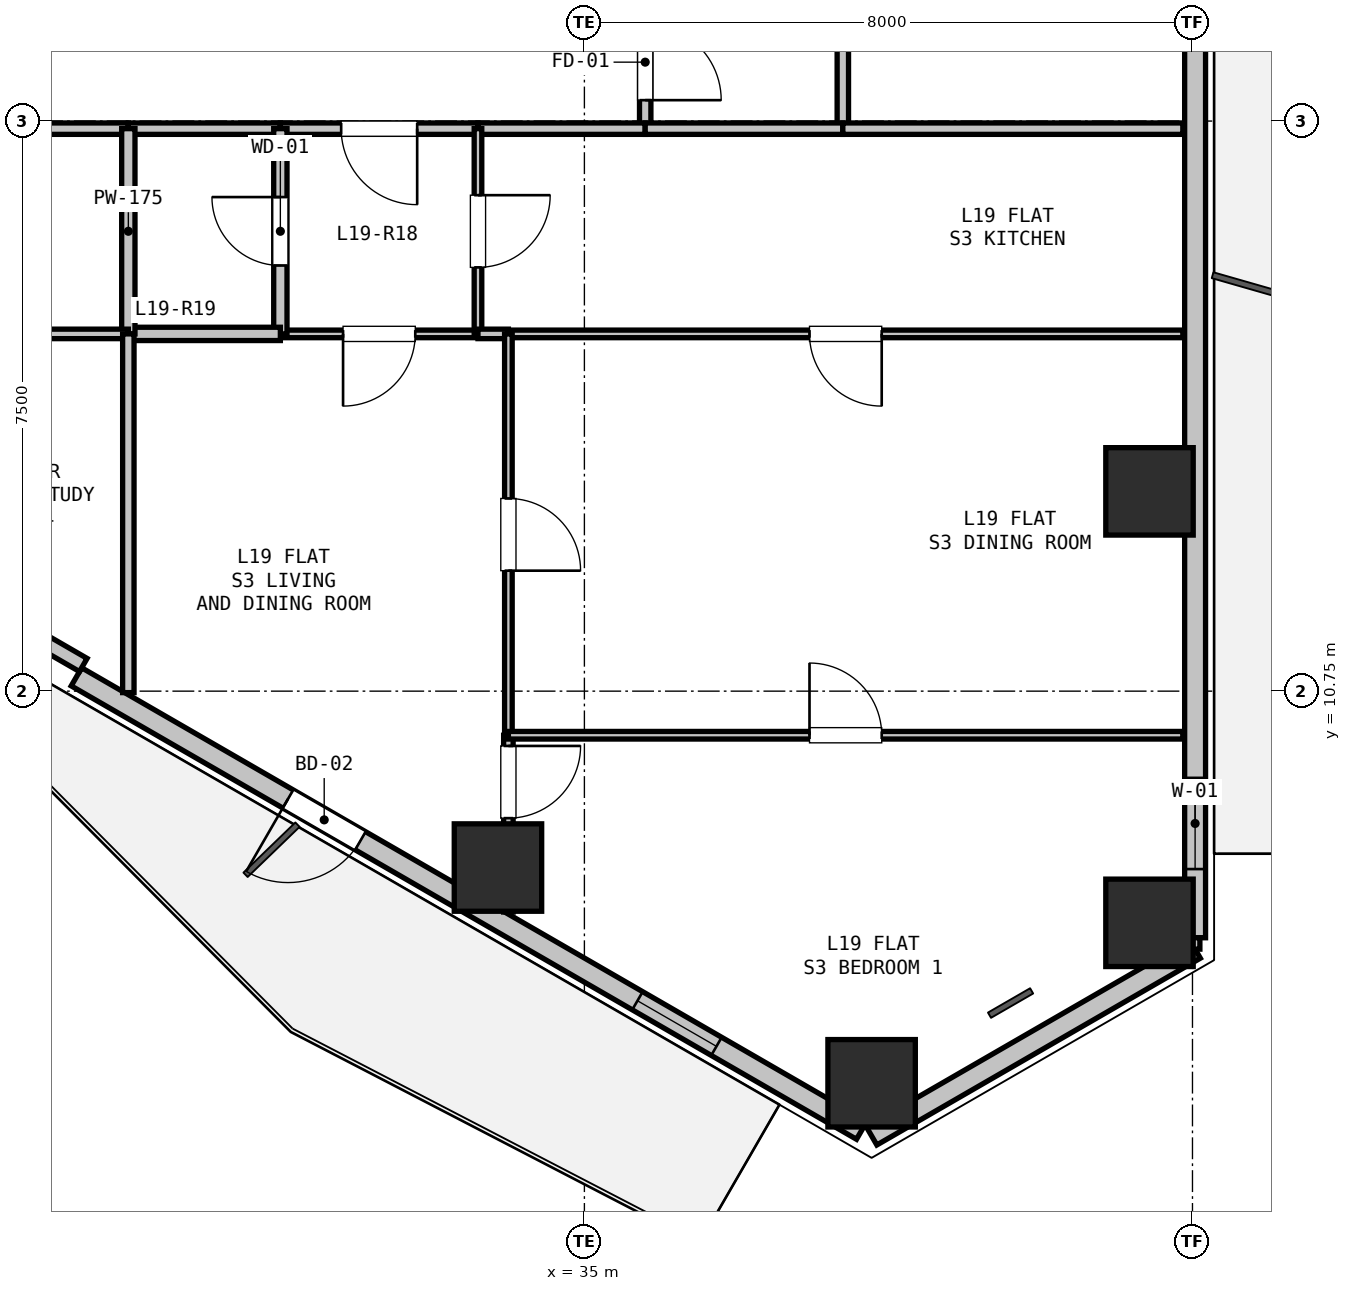
"""IFC4 building model, lengths in metres.
Left out: names, types, materials, properties, quantities, classifications, styles, units other than length and angle.
Written with IfcOpenShell. Run it as: python <this file> out.ifc"""

import sys

from ifc_helpers import new_model, si_unit, direction, frame, frame_2d, origin, origin_2d, place, context, subcontext, project, spatial, rectangle, hollow_rectangle, extrude, element, fill, save


model = new_model("IFC4")
c1 = context("Model", 3, precision=1e-05, world=origin(), true_north=direction((0.0, 1.0)))
c2 = subcontext(c1, "Body", "Model", "MODEL_VIEW")
j1 = project(units=[si_unit("LENGTHUNIT", "METRE"), si_unit("PLANEANGLEUNIT", "RADIAN")], contexts=[c1])
p1 = place(None, origin())
s1 = spatial("IfcSite", under=j1, at=p1, CompositionType="ELEMENT")
p2 = place(p1, origin())
s2 = spatial("IfcBuilding", under=s1, at=p2, CompositionType="ELEMENT")
p3 = place(p2, frame((0.0, 0.0, 73.5)))
s3 = spatial("IfcBuildingStorey", under=s2, at=p3, CompositionType="ELEMENT", Elevation=73.5)
for number, where, z_axis, x_axis in (
    (1, (42.435, 13.378, 0.0), (0.0, 0.0, 1.0), (1.0, 0.0, 0.0)),
    (2, (42.435, 7.702, 0.0), (0.0, 0.0, 1.0), (1.0, 0.0, 0.0)),
    (3, (38.779, 5.591, 0.0), (0.0, 0.0, 1.0), (1.0, 0.0, 0.0)),
    (4, (33.863, 8.429, 0.0), (0.0, 0.0, 1.0), (1.0, 0.0, 0.0)),
):
    element("IfcColumn", number, at=place(p3, frame(where, z_axis=z_axis, x_axis=x_axis)), inside=s3, PredefinedType="COLUMN", context=c2, shape_type="SweptSolid", body=[
        extrude(hollow_rectangle(XDim=1.15, YDim=1.15, WallThickness=0.032, at=origin_2d()), origin(), (0.0, 0.0, 1.0), 3.3),
    ])
p4 = place(p3, frame((43.035, 7.356, 0.0), z_axis=(0.0, 0.0, 1.0), x_axis=(-0.866011848704, -0.500023477353, 0.0)))
e5 = element("IfcWall", 5, at=p4, inside=s3, PredefinedType="SOLIDWALL", context=c2, shape_type="SweptSolid", body=[
    extrude(rectangle(XDim=4.914, YDim=0.275, at=frame_2d((2.457, 0.0))), origin(), (0.0, 0.0, 1.0), 2.67),
])
p5 = place(p3, frame((43.035, 19.435, 0.0), z_axis=(0.0, 0.0, 1.0), x_axis=(0.0, -1.0, 0.0)))
e6 = element("IfcWall", 6, at=p5, inside=s3, PredefinedType="SOLIDWALL", context=c2, shape_type="SweptSolid", body=[
    extrude(rectangle(XDim=11.93, YDim=0.275, at=frame_2d((5.965, 0.0))), origin(), (0.0, 0.0, 1.0), 2.67),
])
p6 = place(p5, frame((9.826, 0.0, 0.9)))
e7 = element("IfcOpeningElement", 7, at=p6, cuts=e6, PredefinedType="OPENING", context=c2, shape_type="SweptSolid", body=[
    extrude(rectangle(XDim=1.2, YDim=1.4, at=frame_2d((0.6, 0.7))), frame((0.0, 0.147, 0.0), z_axis=(0.0, -1.0, 0.0), x_axis=(1.0, 0.0, 0.0)), (0.0, 0.0, 1.0), 0.295),
])
p7 = place(p3, frame((38.649, 4.973, 0.0), z_axis=(0.0, 0.0, 1.0), x_axis=(-0.866023023012, 0.500004123596, 0.0)))
e8 = element("IfcWall", 8, at=p7, inside=s3, PredefinedType="SOLIDWALL", context=c2, shape_type="SweptSolid", body=[
    extrude(rectangle(XDim=11.93, YDim=0.275, at=frame_2d((5.965, 0.0))), origin(), (0.0, 0.0, 1.0), 2.67),
])
p8 = place(p7, frame((7.616, 0.0, 0.0)))
e9 = element("IfcOpeningElement", 9, at=p8, cuts=e8, PredefinedType="OPENING", context=c2, shape_type="SweptSolid", body=[
    extrude(rectangle(XDim=1.1, YDim=2.1, at=frame_2d((0.55, 1.05))), frame((0.0, 0.147, 0.0), z_axis=(0.0, -1.0, 0.0), x_axis=(1.0, 0.0, 0.0)), (0.0, 0.0, 1.0), 0.295),
])
p9 = place(p7, frame((2.207, 0.0, 0.9)))
e10 = element("IfcOpeningElement", 10, at=p9, cuts=e8, PredefinedType="OPENING", context=c2, shape_type="SweptSolid", body=[
    extrude(rectangle(XDim=1.2, YDim=1.4, at=frame_2d((0.6, 0.7))), frame((0.0, 0.147, 0.0), z_axis=(0.0, -1.0, 0.0), x_axis=(1.0, 0.0, 0.0)), (0.0, 0.0, 1.0), 0.295),
])
p10 = place(p3, frame((28.407, 11.094, 0.0), z_axis=(0.0, 0.0, 1.0), x_axis=(-0.86605165483, 0.499954529098, 0.0)))
e11 = element("IfcWall", 11, at=p10, inside=s3, PredefinedType="PARAPET", context=c2, shape_type="SweptSolid", body=[
    extrude(rectangle(XDim=1.7, YDim=0.2, at=frame_2d((0.85, 0.0))), origin(), (0.0, 0.0, 1.0), 2.67),
])
p11 = place(p3, frame((35.8, 19.9, 0.0), z_axis=(0.0, 0.0, 1.0), x_axis=(0.0, -1.0, 0.0)))
e12 = element("IfcWall", 12, at=p11, inside=s3, PredefinedType="PARTITIONING", context=c2, shape_type="SweptSolid", body=[
    extrude(rectangle(XDim=1.75, YDim=0.15, at=frame_2d((0.875, 0.0))), origin(), (0.0, 0.0, 1.0), 3.05),
])
p12 = place(p11, frame((0.375, 0.0, 0.0)))
e13 = element("IfcOpeningElement", 13, at=p12, cuts=e12, PredefinedType="OPENING", context=c2, shape_type="SweptSolid", body=[
    extrude(rectangle(XDim=1.0, YDim=2.15, at=frame_2d((0.5, 1.075))), frame((0.0, 0.085, 0.0), z_axis=(0.0, -1.0, 0.0), x_axis=(1.0, 0.0, 0.0)), (0.0, 0.0, 1.0), 0.17),
])
p13 = place(p3, frame((35.8, 18.15, 0.0), z_axis=(0.0, 0.0, 1.0), x_axis=(-1.0, 0.0, 0.0)))
e14 = element("IfcWall", 14, at=p13, inside=s3, PredefinedType="PARTITIONING", context=c2, shape_type="SweptSolid", body=[
    extrude(rectangle(XDim=2.2, YDim=0.15, at=frame_2d((1.1, 0.0))), origin(), (0.0, 0.0, 1.0), 3.05),
])
p14 = place(p3, frame((33.6, 18.15, 0.0), z_axis=(0.0, 0.0, 1.0), x_axis=(-1.0, 0.0, 0.0)))
e15 = element("IfcWall", 15, at=p14, inside=s3, PredefinedType="PARTITIONING", context=c2, shape_type="SweptSolid", body=[
    extrude(rectangle(XDim=2.6, YDim=0.15, at=frame_2d((1.3, 0.0))), origin(), (0.0, 0.0, 1.0), 3.05),
])
p15 = place(p14, frame((0.8, 0.0, 0.0)))
e16 = element("IfcOpeningElement", 16, at=p15, cuts=e15, PredefinedType="OPENING", context=c2, shape_type="SweptSolid", body=[
    extrude(rectangle(XDim=1.0, YDim=2.15, at=frame_2d((0.5, 1.075))), frame((0.0, 0.085, 0.0), z_axis=(0.0, -1.0, 0.0), x_axis=(1.0, 0.0, 0.0)), (0.0, 0.0, 1.0), 0.17),
])
p16 = place(p3, frame((31.0, 18.15, 0.0), z_axis=(0.0, 0.0, 1.0), x_axis=(-1.0, 0.0, 0.0)))
e17 = element("IfcWall", 17, at=p16, inside=s3, PredefinedType="PARTITIONING", context=c2, shape_type="SweptSolid", body=[
    extrude(rectangle(XDim=2.0, YDim=0.15, at=frame_2d((1.0, 0.0))), origin(), (0.0, 0.0, 1.0), 3.05),
])
p17 = place(p3, frame((29.0, 18.15, 0.0), z_axis=(0.0, 0.0, 1.0), x_axis=(-1.0, 0.0, 0.0)))
e18 = element("IfcWall", 18, at=p17, inside=s3, PredefinedType="PARTITIONING", context=c2, shape_type="SweptSolid", body=[
    extrude(rectangle(XDim=1.9, YDim=0.15, at=frame_2d((0.95, 0.0))), origin(), (0.0, 0.0, 1.0), 3.05),
])
p18 = place(p3, frame((38.4, 21.4, 0.0), z_axis=(0.0, 0.0, 1.0), x_axis=(0.0, -1.0, 0.0)))
e19 = element("IfcWall", 19, at=p18, inside=s3, PredefinedType="PARTITIONING", context=c2, shape_type="SweptSolid", body=[
    extrude(rectangle(XDim=3.25, YDim=0.15, at=frame_2d((1.625, 0.0))), origin(), (0.0, 0.0, 1.0), 3.05),
])
p19 = place(p3, frame((38.4, 18.15, 0.0), z_axis=(0.0, 0.0, 1.0), x_axis=(-1.0, 0.0, 0.0)))
e20 = element("IfcWall", 20, at=p19, inside=s3, PredefinedType="PARTITIONING", context=c2, shape_type="SweptSolid", body=[
    extrude(rectangle(XDim=2.6, YDim=0.15, at=frame_2d((1.3, 0.0))), origin(), (0.0, 0.0, 1.0), 2.423),
])
p20 = place(p3, frame((33.6, 15.45, 0.0), z_axis=(0.0, 0.0, 1.0), x_axis=(-1.0, 0.0, 0.0)))
e21 = element("IfcWall", 21, at=p20, inside=s3, PredefinedType="PARTITIONING", context=c2, shape_type="SweptSolid", body=[
    extrude(rectangle(XDim=2.6, YDim=0.1, at=frame_2d((1.3, 0.0))), origin(), (0.0, 0.0, 1.0), 3.05),
])
p21 = place(p20, frame((0.825, 0.0, 0.0)))
e22 = element("IfcOpeningElement", 22, at=p21, cuts=e21, PredefinedType="OPENING", context=c2, shape_type="SweptSolid", body=[
    extrude(rectangle(XDim=0.95, YDim=2.1, at=frame_2d((0.475, 1.05))), frame((0.0, 0.06, 0.0), z_axis=(0.0, -1.0, 0.0), x_axis=(1.0, 0.0, 0.0)), (0.0, 0.0, 1.0), 0.12),
])
p22 = place(p3, frame((31.0, 15.45, 0.0), z_axis=(0.0, 0.0, 1.0), x_axis=(0.0, 1.0, 0.0)))
e23 = element("IfcWall", 23, at=p22, inside=s3, PredefinedType="PLUMBINGWALL", context=c2, shape_type="SweptSolid", body=[
    extrude(rectangle(XDim=2.7, YDim=0.175, at=frame_2d((1.35, 0.0))), origin(), (0.0, 0.0, 1.0), 3.05),
])
p23 = place(p22, frame((0.9, 0.0, 0.0)))
e24 = element("IfcOpeningElement", 24, at=p23, cuts=e23, PredefinedType="OPENING", context=c2, shape_type="SweptSolid", body=[
    extrude(rectangle(XDim=0.9, YDim=2.1, at=frame_2d((0.45, 1.05))), frame((0.0, 0.097, 0.0), z_axis=(0.0, -1.0, 0.0), x_axis=(1.0, 0.0, 0.0)), (0.0, 0.0, 1.0), 0.195),
])
p24 = place(p3, frame((33.6, 18.15, 0.0), z_axis=(0.0, 0.0, 1.0), x_axis=(0.0, -1.0, 0.0)))
e25 = element("IfcWall", 25, at=p24, inside=s3, PredefinedType="PARTITIONING", context=c2, shape_type="SweptSolid", body=[
    extrude(rectangle(XDim=2.7, YDim=0.1, at=frame_2d((1.35, 0.0))), origin(), (0.0, 0.0, 1.0), 3.05),
])
p25 = place(p24, frame((0.875, 0.0, 0.0)))
e26 = element("IfcOpeningElement", 26, at=p25, cuts=e25, PredefinedType="OPENING", context=c2, shape_type="SweptSolid", body=[
    extrude(rectangle(XDim=0.95, YDim=2.1, at=frame_2d((0.475, 1.05))), frame((0.0, 0.06, 0.0), z_axis=(0.0, -1.0, 0.0), x_axis=(1.0, 0.0, 0.0)), (0.0, 0.0, 1.0), 0.12),
])
p26 = place(p3, frame((31.0, 15.45, 0.0), z_axis=(0.0, 0.0, 1.0), x_axis=(-1.0, 0.0, 0.0)))
e27 = element("IfcWall", 27, at=p26, inside=s3, PredefinedType="PLUMBINGWALL", context=c2, shape_type="SweptSolid", body=[
    extrude(rectangle(XDim=2.0, YDim=0.175, at=frame_2d((1.0, 0.0))), origin(), (0.0, 0.0, 1.0), 3.05),
])
p27 = place(p3, frame((29.0, 15.45, 0.0), z_axis=(0.0, 0.0, 1.0), x_axis=(0.0, 1.0, 0.0)))
e28 = element("IfcWall", 28, at=p27, inside=s3, PredefinedType="PLUMBINGWALL", context=c2, shape_type="SweptSolid", body=[
    extrude(rectangle(XDim=2.7, YDim=0.175, at=frame_2d((1.35, 0.0))), origin(), (0.0, 0.0, 1.0), 3.05),
])
p28 = place(p3, frame((38.4, 18.15, 0.0), z_axis=(0.0, 0.0, 1.0), x_axis=(1.0, 0.0, 0.0)))
e29 = element("IfcWall", 29, at=p28, inside=s3, PredefinedType="PARTITIONING", context=c2, shape_type="SweptSolid", body=[
    extrude(rectangle(XDim=4.473, YDim=0.15, at=frame_2d((2.237, 0.0))), origin(), (0.0, 0.0, 1.0), 2.365),
])
p29 = place(p3, frame((42.873, 15.45, 0.0), z_axis=(0.0, 0.0, 1.0), x_axis=(-1.0, 0.0, 0.0)))
e30 = element("IfcWall", 30, at=p29, inside=s3, PredefinedType="PARTITIONING", context=c2, shape_type="SweptSolid", body=[
    extrude(rectangle(XDim=8.873, YDim=0.1, at=frame_2d((4.437, 0.0))), origin(), (0.0, 0.0, 1.0), 2.365),
])
p30 = place(p29, frame((3.962, 0.0, 0.0)))
e31 = element("IfcOpeningElement", 31, at=p30, cuts=e30, PredefinedType="OPENING", context=c2, shape_type="SweptSolid", body=[
    extrude(rectangle(XDim=0.95, YDim=2.1, at=frame_2d((0.475, 1.05))), frame((0.0, 0.06, 0.0), z_axis=(0.0, -1.0, 0.0), x_axis=(1.0, 0.0, 0.0)), (0.0, 0.0, 1.0), 0.12),
])
p31 = place(p3, frame((34.0, 15.45, 0.0), z_axis=(0.0, 0.0, 1.0), x_axis=(-1.0, 0.0, 0.0)))
e32 = element("IfcWall", 32, at=p31, inside=s3, PredefinedType="PARTITIONING", context=c2, shape_type="SweptSolid", body=[
    extrude(rectangle(XDim=0.4, YDim=0.125, at=frame_2d((0.2, 0.0))), origin(), (0.0, 0.0, 1.0), 3.05),
])
p32 = place(p3, frame((27.1, 15.45, 0.0), z_axis=(0.0, 0.0, 1.0), x_axis=(1.0, 0.0, 0.0)))
e33 = element("IfcWall", 33, at=p32, inside=s3, PredefinedType="PARTITIONING", context=c2, shape_type="SweptSolid", body=[
    extrude(rectangle(XDim=1.9, YDim=0.125, at=frame_2d((0.95, 0.0))), origin(), (0.0, 0.0, 1.0), 3.05),
])
p33 = place(p3, frame((29.0, 15.45, 0.0), z_axis=(0.0, 0.0, 1.0), x_axis=(0.0, -1.0, 0.0)))
e34 = element("IfcWall", 34, at=p33, inside=s3, PredefinedType="PARTITIONING", context=c2, shape_type="SweptSolid", body=[
    extrude(rectangle(XDim=4.719, YDim=0.15, at=frame_2d((2.36, 0.0))), origin(), (0.0, 0.0, 1.0), 2.365),
])
p34 = place(p3, frame((34.0, 15.45, 0.0), z_axis=(0.0, 0.0, 1.0), x_axis=(0.0, -1.0, 0.0)))
e35 = element("IfcWall", 35, at=p34, inside=s3, PredefinedType="PARTITIONING", context=c2, shape_type="SweptSolid", body=[
    extrude(rectangle(XDim=5.28, YDim=0.1, at=frame_2d((2.64, 0.0))), origin(), (0.0, 0.0, 1.0), 3.05),
])
p35 = place(p34, frame((2.165, 0.0, 0.0)))
e36 = element("IfcOpeningElement", 36, at=p35, cuts=e35, PredefinedType="OPENING", context=c2, shape_type="SweptSolid", body=[
    extrude(rectangle(XDim=0.95, YDim=2.1, at=frame_2d((0.475, 1.05))), frame((0.0, 0.06, 0.0), z_axis=(0.0, -1.0, 0.0), x_axis=(1.0, 0.0, 0.0)), (0.0, 0.0, 1.0), 0.12),
])
p36 = place(p3, frame((34.0, 10.17, 0.0), z_axis=(0.0, 0.0, 1.0), x_axis=(0.0, -1.0, 0.0)))
e37 = element("IfcWall", 37, at=p36, inside=s3, PredefinedType="PARTITIONING", context=c2, shape_type="SweptSolid", body=[
    extrude(rectangle(XDim=2.326, YDim=0.125, at=frame_2d((1.163, 0.0))), origin(), (0.0, 0.0, 1.0), 3.05),
])
p37 = place(p36, frame((0.141, 0.0, 0.0)))
e38 = element("IfcOpeningElement", 38, at=p37, cuts=e37, PredefinedType="OPENING", context=c2, shape_type="SweptSolid", body=[
    extrude(rectangle(XDim=0.95, YDim=2.1, at=frame_2d((0.475, 1.05))), frame((0.0, 0.073, 0.0), z_axis=(0.0, -1.0, 0.0), x_axis=(1.0, 0.0, 0.0)), (0.0, 0.0, 1.0), 0.145),
])
p38 = place(p3, frame((34.0, 10.17, 0.0), z_axis=(0.0, 0.0, 1.0), x_axis=(1.0, 0.0, 0.0)))
e39 = element("IfcWall", 39, at=p38, inside=s3, PredefinedType="PARTITIONING", context=c2, shape_type="SweptSolid", body=[
    extrude(rectangle(XDim=8.873, YDim=0.1, at=frame_2d((4.437, 0.0))), origin(), (0.0, 0.0, 1.0), 2.423),
])
p39 = place(p38, frame((3.962, 0.0, 0.0)))
e40 = element("IfcOpeningElement", 40, at=p39, cuts=e39, PredefinedType="OPENING", context=c2, shape_type="SweptSolid", body=[
    extrude(rectangle(XDim=0.95, YDim=2.1, at=frame_2d((0.475, 1.05))), frame((0.0, 0.06, 0.0), z_axis=(0.0, -1.0, 0.0), x_axis=(1.0, 0.0, 0.0)), (0.0, 0.0, 1.0), 0.12),
])
p40 = place(p3, frame((43.035, 7.506, 0.0), z_axis=(0.0, 0.0, 1.0), x_axis=(0.0, -1.0, 0.0)))
e41 = element("IfcWall", 41, at=p40, inside=s3, PredefinedType="PARTITIONING", context=c2, shape_type="SweptSolid", body=[
    extrude(rectangle(XDim=0.15, YDim=0.125, at=frame_2d((0.075, 0.0))), origin(), (0.0, 0.0, 1.0), 3.05),
])
p41 = place(p6, origin())
e42 = element("IfcWindow", 42, at=p41, inside=s3, PartitioningType="SINGLE_PANEL", PredefinedType="WINDOW", context=c2, shape_type="SweptSolid", body=[
    extrude(rectangle(XDim=1.2, YDim=1.4, at=frame_2d((0.6, 0.7))), frame((0.0, 0.03, 0.0), z_axis=(0.0, -1.0, 0.0), x_axis=(1.0, 0.0, 0.0)), (0.0, 0.0, 1.0), 0.06),
])
fill(e7, e42)
p42 = place(p8, origin())
e43 = element("IfcDoor", 43, at=p42, inside=s3, OperationType="SINGLE_SWING_RIGHT", PredefinedType="DOOR", context=c2, shape_type="SweptSolid", body=[
    extrude(rectangle(XDim=1.1, YDim=2.1, at=frame_2d((0.55, 1.05))), frame((0.0, 0.025, 0.0), z_axis=(0.0, -1.0, 0.0), x_axis=(1.0, 0.0, 0.0)), (0.0, 0.0, 1.0), 0.05),
])
fill(e9, e43)
p43 = place(p9, origin())
e44 = element("IfcWindow", 44, at=p43, inside=s3, PartitioningType="SINGLE_PANEL", PredefinedType="WINDOW", context=c2, shape_type="SweptSolid", body=[
    extrude(rectangle(XDim=1.2, YDim=1.4, at=frame_2d((0.6, 0.7))), frame((0.0, 0.03, 0.0), z_axis=(0.0, -1.0, 0.0), x_axis=(1.0, 0.0, 0.0)), (0.0, 0.0, 1.0), 0.06),
])
fill(e10, e44)
p44 = place(p12, origin())
e45 = element("IfcDoor", 45, at=p44, inside=s3, OperationType="SINGLE_SWING_RIGHT", PredefinedType="DOOR", context=c2, shape_type="SweptSolid", body=[
    extrude(rectangle(XDim=1.0, YDim=2.15, at=frame_2d((0.5, 1.075))), frame((0.0, 0.025, 0.0), z_axis=(0.0, -1.0, 0.0), x_axis=(1.0, 0.0, 0.0)), (0.0, 0.0, 1.0), 0.05),
])
fill(e13, e45)
p45 = place(p15, origin())
e46 = element("IfcDoor", 46, at=p45, inside=s3, OperationType="SINGLE_SWING_LEFT", PredefinedType="DOOR", context=c2, shape_type="SweptSolid", body=[
    extrude(rectangle(XDim=1.0, YDim=2.15, at=frame_2d((0.5, 1.075))), frame((0.0, 0.025, 0.0), z_axis=(0.0, -1.0, 0.0), x_axis=(1.0, 0.0, 0.0)), (0.0, 0.0, 1.0), 0.05),
])
fill(e16, e46)
p46 = place(p23, origin())
e47 = element("IfcDoor", 47, at=p46, inside=s3, OperationType="SINGLE_SWING_RIGHT", PredefinedType="DOOR", context=c2, shape_type="SweptSolid", body=[
    extrude(rectangle(XDim=0.9, YDim=2.1, at=frame_2d((0.45, 1.05))), frame((0.0, 0.025, 0.0), z_axis=(0.0, -1.0, 0.0), x_axis=(1.0, 0.0, 0.0)), (0.0, 0.0, 1.0), 0.05),
])
fill(e24, e47)
p47 = place(p25, origin())
e48 = element("IfcDoor", 48, at=p47, inside=s3, OperationType="SINGLE_SWING_LEFT", PredefinedType="DOOR", context=c2, shape_type="SweptSolid", body=[
    extrude(rectangle(XDim=0.95, YDim=2.1, at=frame_2d((0.475, 1.05))), frame((0.0, 0.025, 0.0), z_axis=(0.0, -1.0, 0.0), x_axis=(1.0, 0.0, 0.0)), (0.0, 0.0, 1.0), 0.05),
])
fill(e26, e48)
p48 = place(p21, origin())
e49 = element("IfcDoor", 49, at=p48, inside=s3, OperationType="SINGLE_SWING_RIGHT", PredefinedType="DOOR", context=c2, shape_type="SweptSolid", body=[
    extrude(rectangle(XDim=0.95, YDim=2.1, at=frame_2d((0.475, 1.05))), frame((0.0, 0.025, 0.0), z_axis=(0.0, -1.0, 0.0), x_axis=(1.0, 0.0, 0.0)), (0.0, 0.0, 1.0), 0.05),
])
fill(e22, e49)
p49 = place(p30, origin())
e50 = element("IfcDoor", 50, at=p49, inside=s3, OperationType="SINGLE_SWING_LEFT", PredefinedType="DOOR", context=c2, shape_type="SweptSolid", body=[
    extrude(rectangle(XDim=0.95, YDim=2.1, at=frame_2d((0.475, 1.05))), frame((0.0, 0.025, 0.0), z_axis=(0.0, -1.0, 0.0), x_axis=(1.0, 0.0, 0.0)), (0.0, 0.0, 1.0), 0.05),
])
fill(e31, e50)
p50 = place(p37, origin())
e51 = element("IfcDoor", 51, at=p50, inside=s3, OperationType="SINGLE_SWING_LEFT", PredefinedType="DOOR", context=c2, shape_type="SweptSolid", body=[
    extrude(rectangle(XDim=0.95, YDim=2.1, at=frame_2d((0.475, 1.05))), frame((0.0, 0.025, 0.0), z_axis=(0.0, -1.0, 0.0), x_axis=(1.0, 0.0, 0.0)), (0.0, 0.0, 1.0), 0.05),
])
fill(e38, e51)
p51 = place(p35, origin())
e52 = element("IfcDoor", 52, at=p51, inside=s3, OperationType="SINGLE_SWING_RIGHT", PredefinedType="DOOR", context=c2, shape_type="SweptSolid", body=[
    extrude(rectangle(XDim=0.95, YDim=2.1, at=frame_2d((0.475, 1.05))), frame((0.0, 0.025, 0.0), z_axis=(0.0, -1.0, 0.0), x_axis=(1.0, 0.0, 0.0)), (0.0, 0.0, 1.0), 0.05),
])
fill(e36, e52)
p52 = place(p39, origin())
e53 = element("IfcDoor", 53, at=p52, inside=s3, OperationType="SINGLE_SWING_LEFT", PredefinedType="DOOR", context=c2, shape_type="SweptSolid", body=[
    extrude(rectangle(XDim=0.95, YDim=2.1, at=frame_2d((0.475, 1.05))), frame((0.0, 0.025, 0.0), z_axis=(0.0, -1.0, 0.0), x_axis=(1.0, 0.0, 0.0)), (0.0, 0.0, 1.0), 0.05),
])
fill(e40, e53)
save(model, sys.argv[1])
